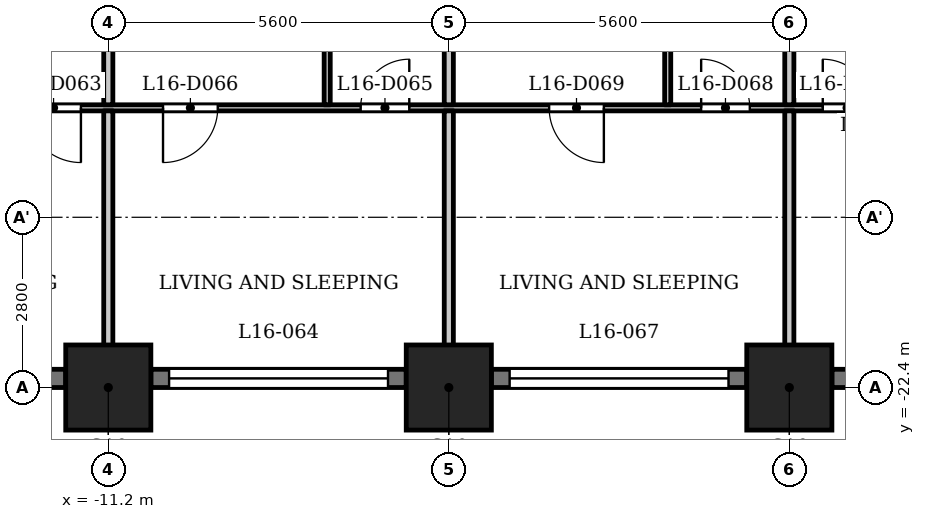
"""IFC4 building model, lengths in metres.
Left out: names, types, materials, properties, quantities, classifications, styles, units other than length and angle.
Written with IfcOpenShell. Run it as: python <this file> out.ifc"""

import sys

from ifc_helpers import new_model, si_unit, direction, frame, frame_2d, origin, origin_2d, place, context, subcontext, project, spatial, rectangle, extrude, element, fill, save


model = new_model("IFC4")
c1 = context("Model", 3, precision=1e-05, world=origin(), true_north=direction((0.0, 1.0)))
c2 = subcontext(c1, "Body", "Model", "MODEL_VIEW")
j1 = project(units=[si_unit("LENGTHUNIT", "METRE"), si_unit("PLANEANGLEUNIT", "RADIAN")], contexts=[c1])
p1 = place(None, origin())
s1 = spatial("IfcSite", under=j1, at=p1, CompositionType="ELEMENT")
p2 = place(p1, origin())
s2 = spatial("IfcBuilding", under=s1, at=p2, CompositionType="ELEMENT")
p3 = place(p2, frame((0.0, 0.0, 65.5)))
s3 = spatial("IfcBuildingStorey", under=s2, at=p3, CompositionType="ELEMENT", Elevation=65.5)
for number, where, z_axis, x_axis in (
    (1, (-11.2, -22.4, 0.0), (0.0, 0.0, 1.0), (1.0, 0.0, 0.0)),
    (2, (-5.6, -22.4, 0.0), (0.0, 0.0, 1.0), (1.0, 0.0, 0.0)),
    (3, (0.0, -22.4, 0.0), (0.0, 0.0, 1.0), (1.0, 0.0, 0.0)),
):
    element("IfcColumn", number, at=place(p3, frame(where, z_axis=z_axis, x_axis=x_axis)), inside=s3, PredefinedType="COLUMN", context=c2, shape_type="SweptSolid", body=[
        extrude(rectangle(XDim=1.4, YDim=1.4, at=origin_2d()), origin(), (0.0, 0.0, 1.0), 3.5),
    ])
p4 = place(p3, frame((-16.1, -22.25, 0.0), z_axis=(0.0, 0.0, 1.0), x_axis=(1.0, 0.0, 0.0)))
e4 = element("IfcWall", 4, at=p4, inside=s3, PredefinedType="SOLIDWALL", context=c2, shape_type="SweptSolid", body=[
    extrude(rectangle(XDim=4.2, YDim=0.3, at=frame_2d((2.1, 0.0))), origin(), (0.0, 0.0, 1.0), 2.35),
])
p5 = place(p4, frame((0.3, 0.0, 1.2)))
e5 = element("IfcOpeningElement", 5, at=p5, cuts=e4, PredefinedType="OPENING", context=c2, shape_type="SweptSolid", body=[
    extrude(rectangle(XDim=3.6, YDim=0.95, at=frame_2d((1.8, 0.475))), frame((0.0, 0.16, 0.0), z_axis=(0.0, -1.0, 0.0), x_axis=(1.0, 0.0, 0.0)), (0.0, 0.0, 1.0), 0.32),
])
p6 = place(p3, frame((-10.5, -22.25, 0.0), z_axis=(0.0, 0.0, 1.0), x_axis=(1.0, 0.0, 0.0)))
e6 = element("IfcWall", 6, at=p6, inside=s3, PredefinedType="SOLIDWALL", context=c2, shape_type="SweptSolid", body=[
    extrude(rectangle(XDim=4.2, YDim=0.3, at=frame_2d((2.1, 0.0))), origin(), (0.0, 0.0, 1.0), 2.35),
])
p7 = place(p6, frame((0.3, 0.0, 1.2)))
e7 = element("IfcOpeningElement", 7, at=p7, cuts=e6, PredefinedType="OPENING", context=c2, shape_type="SweptSolid", body=[
    extrude(rectangle(XDim=3.6, YDim=0.95, at=frame_2d((1.8, 0.475))), frame((0.0, 0.16, 0.0), z_axis=(0.0, -1.0, 0.0), x_axis=(1.0, 0.0, 0.0)), (0.0, 0.0, 1.0), 0.32),
])
p8 = place(p3, frame((-4.9, -22.25, 0.0), z_axis=(0.0, 0.0, 1.0), x_axis=(1.0, 0.0, 0.0)))
e8 = element("IfcWall", 8, at=p8, inside=s3, PredefinedType="SOLIDWALL", context=c2, shape_type="SweptSolid", body=[
    extrude(rectangle(XDim=4.2, YDim=0.3, at=frame_2d((2.1, 0.0))), origin(), (0.0, 0.0, 1.0), 2.35),
])
p9 = place(p8, frame((0.3, 0.0, 1.2)))
e9 = element("IfcOpeningElement", 9, at=p9, cuts=e8, PredefinedType="OPENING", context=c2, shape_type="SweptSolid", body=[
    extrude(rectangle(XDim=3.6, YDim=0.95, at=frame_2d((1.8, 0.475))), frame((0.0, 0.16, 0.0), z_axis=(0.0, -1.0, 0.0), x_axis=(1.0, 0.0, 0.0)), (0.0, 0.0, 1.0), 0.32),
])
p10 = place(p3, frame((0.7, -22.25, 0.0), z_axis=(0.0, 0.0, 1.0), x_axis=(1.0, 0.0, 0.0)))
e10 = element("IfcWall", 10, at=p10, inside=s3, PredefinedType="SOLIDWALL", context=c2, shape_type="SweptSolid", body=[
    extrude(rectangle(XDim=4.2, YDim=0.3, at=frame_2d((2.1, 0.0))), origin(), (0.0, 0.0, 1.0), 2.35),
])
p11 = place(p10, frame((0.3, 0.0, 1.2)))
e11 = element("IfcOpeningElement", 11, at=p11, cuts=e10, PredefinedType="OPENING", context=c2, shape_type="SweptSolid", body=[
    extrude(rectangle(XDim=3.6, YDim=0.95, at=frame_2d((1.8, 0.475))), frame((0.0, 0.16, 0.0), z_axis=(0.0, -1.0, 0.0), x_axis=(1.0, 0.0, 0.0)), (0.0, 0.0, 1.0), 0.32),
])
p12 = place(p3, frame((-26.394, -17.8, 0.0), z_axis=(0.0, 0.0, 1.0), x_axis=(1.0, 0.0, 0.0)))
e12 = element("IfcWall", 12, at=p12, inside=s3, PredefinedType="PARTITIONING", context=c2, shape_type="SweptSolid", body=[
    extrude(rectangle(XDim=53.034, YDim=0.1, at=frame_2d((26.517, 0.0))), origin(), (0.0, 0.0, 1.0), 3.2),
])
p13 = place(p12, frame((0.794, 0.0, 0.0)))
e13 = element("IfcOpeningElement", 13, at=p13, cuts=e12, PredefinedType="OPENING", context=c2, shape_type="SweptSolid", body=[
    extrude(rectangle(XDim=0.8, YDim=2.1, at=frame_2d((0.4, 1.05))), frame((0.0, 0.06, 0.0), z_axis=(0.0, -1.0, 0.0), x_axis=(1.0, 0.0, 0.0)), (0.0, 0.0, 1.0), 0.12),
])
p14 = place(p12, frame((5.644, 0.0, 0.0)))
e14 = element("IfcOpeningElement", 14, at=p14, cuts=e12, PredefinedType="OPENING", context=c2, shape_type="SweptSolid", body=[
    extrude(rectangle(XDim=0.9, YDim=2.1, at=frame_2d((0.45, 1.05))), frame((0.0, 0.06, 0.0), z_axis=(0.0, -1.0, 0.0), x_axis=(1.0, 0.0, 0.0)), (0.0, 0.0, 1.0), 0.12),
])
p15 = place(p12, frame((10.494, 0.0, 0.0)))
e15 = element("IfcOpeningElement", 15, at=p15, cuts=e12, PredefinedType="OPENING", context=c2, shape_type="SweptSolid", body=[
    extrude(rectangle(XDim=0.8, YDim=2.1, at=frame_2d((0.4, 1.05))), frame((0.0, 0.06, 0.0), z_axis=(0.0, -1.0, 0.0), x_axis=(1.0, 0.0, 0.0)), (0.0, 0.0, 1.0), 0.12),
])
p16 = place(p12, frame((13.844, 0.0, 0.0)))
e16 = element("IfcOpeningElement", 16, at=p16, cuts=e12, PredefinedType="OPENING", context=c2, shape_type="SweptSolid", body=[
    extrude(rectangle(XDim=0.9, YDim=2.1, at=frame_2d((0.45, 1.05))), frame((0.0, 0.06, 0.0), z_axis=(0.0, -1.0, 0.0), x_axis=(1.0, 0.0, 0.0)), (0.0, 0.0, 1.0), 0.12),
])
p17 = place(p12, frame((19.344, 0.0, 0.0)))
e17 = element("IfcOpeningElement", 17, at=p17, cuts=e12, PredefinedType="OPENING", context=c2, shape_type="SweptSolid", body=[
    extrude(rectangle(XDim=0.8, YDim=2.1, at=frame_2d((0.4, 1.05))), frame((0.0, 0.06, 0.0), z_axis=(0.0, -1.0, 0.0), x_axis=(1.0, 0.0, 0.0)), (0.0, 0.0, 1.0), 0.12),
])
p18 = place(p12, frame((16.094, 0.0, 0.0)))
e18 = element("IfcOpeningElement", 18, at=p18, cuts=e12, PredefinedType="OPENING", context=c2, shape_type="SweptSolid", body=[
    extrude(rectangle(XDim=0.9, YDim=2.1, at=frame_2d((0.45, 1.05))), frame((0.0, 0.06, 0.0), z_axis=(0.0, -1.0, 0.0), x_axis=(1.0, 0.0, 0.0)), (0.0, 0.0, 1.0), 0.12),
])
p19 = place(p12, frame((24.944, 0.0, 0.0)))
e19 = element("IfcOpeningElement", 19, at=p19, cuts=e12, PredefinedType="OPENING", context=c2, shape_type="SweptSolid", body=[
    extrude(rectangle(XDim=0.8, YDim=2.1, at=frame_2d((0.4, 1.05))), frame((0.0, 0.06, 0.0), z_axis=(0.0, -1.0, 0.0), x_axis=(1.0, 0.0, 0.0)), (0.0, 0.0, 1.0), 0.12),
])
p20 = place(p12, frame((22.444, 0.0, 0.0)))
e20 = element("IfcOpeningElement", 20, at=p20, cuts=e12, PredefinedType="OPENING", context=c2, shape_type="SweptSolid", body=[
    extrude(rectangle(XDim=0.9, YDim=2.1, at=frame_2d((0.45, 1.05))), frame((0.0, 0.06, 0.0), z_axis=(0.0, -1.0, 0.0), x_axis=(1.0, 0.0, 0.0)), (0.0, 0.0, 1.0), 0.12),
])
p21 = place(p12, frame((26.944, 0.0, 0.0)))
e21 = element("IfcOpeningElement", 21, at=p21, cuts=e12, PredefinedType="OPENING", context=c2, shape_type="SweptSolid", body=[
    extrude(rectangle(XDim=0.8, YDim=2.1, at=frame_2d((0.4, 1.05))), frame((0.0, 0.06, 0.0), z_axis=(0.0, -1.0, 0.0), x_axis=(1.0, 0.0, 0.0)), (0.0, 0.0, 1.0), 0.12),
])
p22 = place(p12, frame((29.794, 0.0, 0.0)))
e22 = element("IfcOpeningElement", 22, at=p22, cuts=e12, PredefinedType="OPENING", context=c2, shape_type="SweptSolid", body=[
    extrude(rectangle(XDim=0.9, YDim=2.1, at=frame_2d((0.45, 1.05))), frame((0.0, 0.06, 0.0), z_axis=(0.0, -1.0, 0.0), x_axis=(1.0, 0.0, 0.0)), (0.0, 0.0, 1.0), 0.12),
])
p23 = place(p12, frame((33.394, 0.0, 0.0)))
e23 = element("IfcOpeningElement", 23, at=p23, cuts=e12, PredefinedType="OPENING", context=c2, shape_type="SweptSolid", body=[
    extrude(rectangle(XDim=0.9, YDim=2.1, at=frame_2d((0.45, 1.05))), frame((0.0, 0.06, 0.0), z_axis=(0.0, -1.0, 0.0), x_axis=(1.0, 0.0, 0.0)), (0.0, 0.0, 1.0), 0.12),
])
p24 = place(p12, frame((34.944, 0.0, 0.0)))
e24 = element("IfcOpeningElement", 24, at=p24, cuts=e12, PredefinedType="OPENING", context=c2, shape_type="SweptSolid", body=[
    extrude(rectangle(XDim=0.9, YDim=2.1, at=frame_2d((0.45, 1.05))), frame((0.0, 0.06, 0.0), z_axis=(0.0, -1.0, 0.0), x_axis=(1.0, 0.0, 0.0)), (0.0, 0.0, 1.0), 0.12),
])
p25 = place(p12, frame((38.144, 0.0, 0.0)))
e25 = element("IfcOpeningElement", 25, at=p25, cuts=e12, PredefinedType="OPENING", context=c2, shape_type="SweptSolid", body=[
    extrude(rectangle(XDim=0.8, YDim=2.1, at=frame_2d((0.4, 1.05))), frame((0.0, 0.06, 0.0), z_axis=(0.0, -1.0, 0.0), x_axis=(1.0, 0.0, 0.0)), (0.0, 0.0, 1.0), 0.12),
])
p26 = place(p12, frame((40.244, 0.0, 0.0)))
e26 = element("IfcOpeningElement", 26, at=p26, cuts=e12, PredefinedType="OPENING", context=c2, shape_type="SweptSolid", body=[
    extrude(rectangle(XDim=0.9, YDim=2.1, at=frame_2d((0.45, 1.05))), frame((0.0, 0.06, 0.0), z_axis=(0.0, -1.0, 0.0), x_axis=(1.0, 0.0, 0.0)), (0.0, 0.0, 1.0), 0.12),
])
p27 = place(p12, frame((49.362, 0.0, 0.0)))
e27 = element("IfcOpeningElement", 27, at=p27, cuts=e12, PredefinedType="OPENING", context=c2, shape_type="SweptSolid", body=[
    extrude(rectangle(XDim=0.8, YDim=2.1, at=frame_2d((0.4, 1.05))), frame((0.0, 0.06, 0.0), z_axis=(0.0, -1.0, 0.0), x_axis=(1.0, 0.0, 0.0)), (0.0, 0.0, 1.0), 0.12),
])
p28 = place(p12, frame((45.094, 0.0, 0.0)))
e28 = element("IfcOpeningElement", 28, at=p28, cuts=e12, PredefinedType="OPENING", context=c2, shape_type="SweptSolid", body=[
    extrude(rectangle(XDim=0.9, YDim=2.1, at=frame_2d((0.45, 1.05))), frame((0.0, 0.06, 0.0), z_axis=(0.0, -1.0, 0.0), x_axis=(1.0, 0.0, 0.0)), (0.0, 0.0, 1.0), 0.12),
])
p29 = place(p3, frame((-11.2, -23.08, 0.0), z_axis=(0.0, 0.0, 1.0), x_axis=(0.0, 1.0, 0.0)))
e29 = element("IfcWall", 29, at=p29, inside=s3, PredefinedType="PARTITIONING", context=c2, shape_type="SweptSolid", body=[
    extrude(rectangle(XDim=5.23, YDim=0.15, at=frame_2d((2.615, 0.0))), origin(), (0.0, 0.0, 1.0), 3.2),
])
p30 = place(p3, frame((-11.2, -17.75, 0.0), z_axis=(0.0, 0.0, 1.0), x_axis=(0.0, 1.0, 0.0)))
e30 = element("IfcWall", 30, at=p30, inside=s3, PredefinedType="PARTITIONING", context=c2, shape_type="SweptSolid", body=[
    extrude(rectangle(XDim=2.275, YDim=0.15, at=frame_2d((1.137, 0.0))), origin(), (0.0, 0.0, 1.0), 3.2),
])
p31 = place(p3, frame((-7.6, -17.75, 0.0), z_axis=(0.0, 0.0, 1.0), x_axis=(0.0, 1.0, 0.0)))
e31 = element("IfcWall", 31, at=p31, inside=s3, PredefinedType="PARTITIONING", context=c2, shape_type="SweptSolid", body=[
    extrude(rectangle(XDim=2.275, YDim=0.1, at=frame_2d((1.137, 0.0))), origin(), (0.0, 0.0, 1.0), 3.2),
])
p32 = place(p3, frame((-5.6, -23.08, 0.0), z_axis=(0.0, 0.0, 1.0), x_axis=(0.0, 1.0, 0.0)))
e32 = element("IfcWall", 32, at=p32, inside=s3, PredefinedType="PARTITIONING", context=c2, shape_type="SweptSolid", body=[
    extrude(rectangle(XDim=5.23, YDim=0.15, at=frame_2d((2.615, 0.0))), origin(), (0.0, 0.0, 1.0), 3.2),
])
p33 = place(p3, frame((-5.6, -17.75, 0.0), z_axis=(0.0, 0.0, 1.0), x_axis=(0.0, 1.0, 0.0)))
e33 = element("IfcWall", 33, at=p33, inside=s3, PredefinedType="PARTITIONING", context=c2, shape_type="SweptSolid", body=[
    extrude(rectangle(XDim=2.275, YDim=0.15, at=frame_2d((1.137, 0.0))), origin(), (0.0, 0.0, 1.0), 3.2),
])
p34 = place(p3, frame((-2.0, -17.75, 0.0), z_axis=(0.0, 0.0, 1.0), x_axis=(0.0, 1.0, 0.0)))
e34 = element("IfcWall", 34, at=p34, inside=s3, PredefinedType="PARTITIONING", context=c2, shape_type="SweptSolid", body=[
    extrude(rectangle(XDim=2.275, YDim=0.1, at=frame_2d((1.137, 0.0))), origin(), (0.0, 0.0, 1.0), 3.2),
])
p35 = place(p3, frame((0.0, -23.08, 0.0), z_axis=(0.0, 0.0, 1.0), x_axis=(0.0, 1.0, 0.0)))
e35 = element("IfcWall", 35, at=p35, inside=s3, PredefinedType="PARTITIONING", context=c2, shape_type="SweptSolid", body=[
    extrude(rectangle(XDim=5.23, YDim=0.15, at=frame_2d((2.615, 0.0))), origin(), (0.0, 0.0, 1.0), 3.2),
])
p36 = place(p3, frame((0.0, -17.75, 0.0), z_axis=(0.0, 0.0, 1.0), x_axis=(0.0, 1.0, 0.0)))
e36 = element("IfcWall", 36, at=p36, inside=s3, PredefinedType="PARTITIONING", context=c2, shape_type="SweptSolid", body=[
    extrude(rectangle(XDim=2.275, YDim=0.15, at=frame_2d((1.137, 0.0))), origin(), (0.0, 0.0, 1.0), 3.2),
])
p37 = place(p16, origin())
e37 = element("IfcDoor", 37, at=p37, inside=s3, OperationType="SINGLE_SWING_RIGHT", PredefinedType="DOOR", context=c2, shape_type="SweptSolid", body=[
    extrude(rectangle(XDim=0.9, YDim=2.1, at=frame_2d((0.45, 1.05))), frame((0.0, 0.025, 0.0), z_axis=(0.0, -1.0, 0.0), x_axis=(1.0, 0.0, 0.0)), (0.0, 0.0, 1.0), 0.05),
])
fill(e16, e37)
p38 = place(p17, origin())
e38 = element("IfcDoor", 38, at=p38, inside=s3, OperationType="SINGLE_SWING_LEFT", PredefinedType="DOOR", context=c2, shape_type="SweptSolid", body=[
    extrude(rectangle(XDim=0.8, YDim=2.1, at=frame_2d((0.4, 1.05))), frame((0.0, 0.025, 0.0), z_axis=(0.0, -1.0, 0.0), x_axis=(1.0, 0.0, 0.0)), (0.0, 0.0, 1.0), 0.05),
])
fill(e17, e38)
p39 = place(p18, origin())
e39 = element("IfcDoor", 39, at=p39, inside=s3, OperationType="SINGLE_SWING_LEFT", PredefinedType="DOOR", context=c2, shape_type="SweptSolid", body=[
    extrude(rectangle(XDim=0.9, YDim=2.1, at=frame_2d((0.45, 1.05))), frame((0.0, 0.025, 0.0), z_axis=(0.0, -1.0, 0.0), x_axis=(1.0, 0.0, 0.0)), (0.0, 0.0, 1.0), 0.05),
])
fill(e18, e39)
p40 = place(p19, origin())
e40 = element("IfcDoor", 40, at=p40, inside=s3, OperationType="SINGLE_SWING_RIGHT", PredefinedType="DOOR", context=c2, shape_type="SweptSolid", body=[
    extrude(rectangle(XDim=0.8, YDim=2.1, at=frame_2d((0.4, 1.05))), frame((0.0, 0.025, 0.0), z_axis=(0.0, -1.0, 0.0), x_axis=(1.0, 0.0, 0.0)), (0.0, 0.0, 1.0), 0.05),
])
fill(e19, e40)
p41 = place(p20, origin())
e41 = element("IfcDoor", 41, at=p41, inside=s3, OperationType="SINGLE_SWING_RIGHT", PredefinedType="DOOR", context=c2, shape_type="SweptSolid", body=[
    extrude(rectangle(XDim=0.9, YDim=2.1, at=frame_2d((0.45, 1.05))), frame((0.0, 0.025, 0.0), z_axis=(0.0, -1.0, 0.0), x_axis=(1.0, 0.0, 0.0)), (0.0, 0.0, 1.0), 0.05),
])
fill(e20, e41)
p42 = place(p21, origin())
e42 = element("IfcDoor", 42, at=p42, inside=s3, OperationType="SINGLE_SWING_RIGHT", PredefinedType="DOOR", context=c2, shape_type="SweptSolid", body=[
    extrude(rectangle(XDim=0.8, YDim=2.1, at=frame_2d((0.4, 1.05))), frame((0.0, 0.025, 0.0), z_axis=(0.0, -1.0, 0.0), x_axis=(1.0, 0.0, 0.0)), (0.0, 0.0, 1.0), 0.05),
])
fill(e21, e42)
p43 = place(p7, origin())
e43 = element("IfcWindow", 43, at=p43, inside=s3, PartitioningType="SINGLE_PANEL", PredefinedType="WINDOW", context=c2, shape_type="SweptSolid", body=[
    extrude(rectangle(XDim=3.6, YDim=0.95, at=frame_2d((1.8, 0.475))), frame((0.0, 0.03, 0.0), z_axis=(0.0, -1.0, 0.0), x_axis=(1.0, 0.0, 0.0)), (0.0, 0.0, 1.0), 0.06),
])
fill(e7, e43)
p44 = place(p9, origin())
e44 = element("IfcWindow", 44, at=p44, inside=s3, PartitioningType="SINGLE_PANEL", PredefinedType="WINDOW", context=c2, shape_type="SweptSolid", body=[
    extrude(rectangle(XDim=3.6, YDim=0.95, at=frame_2d((1.8, 0.475))), frame((0.0, 0.03, 0.0), z_axis=(0.0, -1.0, 0.0), x_axis=(1.0, 0.0, 0.0)), (0.0, 0.0, 1.0), 0.06),
])
fill(e9, e44)
save(model, sys.argv[1])
